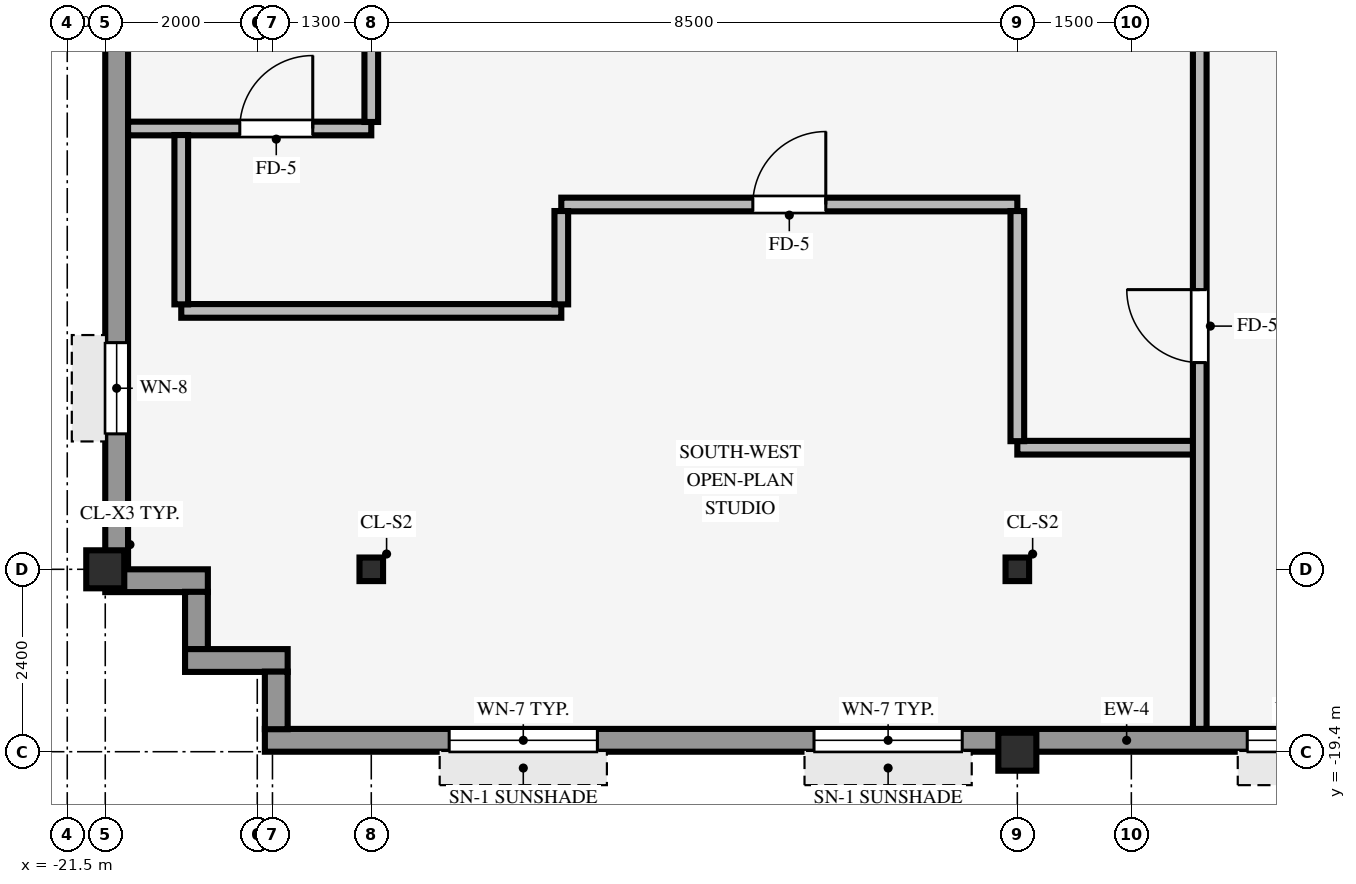
"""IFC4 building model, lengths in metres.
Left out: names, types, materials, properties, quantities, classifications, styles, units other than length and angle.
Written with IfcOpenShell. Run it as: python <this file> out.ifc"""

import sys

from ifc_helpers import new_model, si_unit, direction, frame, frame_2d, origin, origin_2d, place, context, subcontext, project, spatial, rectangle, hollow_rectangle, i_section, extrude, source, transform, mapped, element, fill, save


model = new_model("IFC4")
c1 = context("Model", 3, precision=1e-05, world=origin(), true_north=direction((0.0, 1.0)))
c2 = subcontext(c1, "Body", "Model", "MODEL_VIEW")
j1 = project(units=[si_unit("LENGTHUNIT", "METRE"), si_unit("PLANEANGLEUNIT", "RADIAN")], contexts=[c1])
p1 = place(None, origin())
s1 = spatial("IfcSite", under=j1, at=p1, CompositionType="ELEMENT")
p2 = place(p1, origin())
s2 = spatial("IfcBuilding", under=s1, at=p2, CompositionType="ELEMENT")
p3 = place(p2, frame((0.0, 0.0, 265.25)))
s3 = spatial("IfcBuildingStorey", under=s2, at=p3, CompositionType="ELEMENT", Elevation=265.25)
for number, where, z_axis, x_axis in (
    (1, (-21.0, -17.0, 0.0), (0.0, 0.0, 1.0), (1.0, 0.0, 0.0)),
    (2, (-9.0, -19.4, 0.0), (0.0, 0.0, 1.0), (1.0, 0.0, 0.0)),
):
    element("IfcColumn", number, at=place(p3, frame(where, z_axis=z_axis, x_axis=x_axis)), inside=s3, PredefinedType="COLUMN", context=c2, shape_type="SweptSolid", body=[
        extrude(hollow_rectangle(XDim=0.5, YDim=0.5, WallThickness=0.032, InnerFilletRadius=0.032, OuterFilletRadius=0.064, at=origin_2d()), origin(), (0.0, 0.0, 1.0), 3.37),
    ])
for number, where, z_axis, x_axis in (
    (3, (-17.5, -17.0, 0.0), (0.0, 0.0, 1.0), (1.0, 0.0, 0.0)),
    (4, (-9.0, -17.0, 0.0), (0.0, 0.0, 1.0), (1.0, 0.0, 0.0)),
):
    element("IfcColumn", number, at=place(p3, frame(where, z_axis=z_axis, x_axis=x_axis)), inside=s3, PredefinedType="COLUMN", context=c2, shape_type="SweptSolid", body=[
        extrude(i_section(OverallWidth=0.31, OverallDepth=0.31, WebThickness=0.015, FlangeThickness=0.015, FilletRadius=0.015, at=origin_2d()), origin(), (0.0, 0.0, 1.0), 3.37),
    ])
p4 = place(p3, frame((-18.9, -19.25, 0.0), z_axis=(0.0, 0.0, 1.0), x_axis=(1.0, 0.0, 0.0)))
e5 = element("IfcWall", 5, at=p4, inside=s3, PredefinedType="STANDARD", context=c2, shape_type="SweptSolid", body=[
    extrude(rectangle(XDim=35.6, YDim=0.3, at=frame_2d((17.8, 0.0))), origin(), (0.0, 0.0, 1.0), 2.705),
])
p5 = place(p4, frame((24.15, 0.0, 0.0), z_axis=(0.0, 0.0, 1.0), x_axis=(-1.0, 0.0, 0.0)))
e6 = element("IfcOpeningElement", 6, at=p5, cuts=e5, PredefinedType="OPENING", context=c2, shape_type="SweptSolid", body=[
    extrude(rectangle(XDim=1.05, YDim=2.1, at=frame_2d((0.525, 1.05))), frame((0.0, 0.16, 0.0), z_axis=(0.0, -1.0, 0.0), x_axis=(1.0, 0.0, 0.0)), (0.0, 0.0, 1.0), 0.32),
])
p6 = place(p4, frame((2.425, 0.0, 0.8)))
e7 = element("IfcOpeningElement", 7, at=p6, cuts=e5, PredefinedType="OPENING", context=c2, shape_type="SweptSolid", body=[
    extrude(rectangle(XDim=1.95, YDim=1.48, at=frame_2d((0.975, 0.74))), frame((0.0, 0.16, 0.0), z_axis=(0.0, -1.0, 0.0), x_axis=(1.0, 0.0, 0.0)), (0.0, 0.0, 1.0), 0.32),
])
p7 = place(p4, frame((7.225, 0.0, 0.8)))
e8 = element("IfcOpeningElement", 8, at=p7, cuts=e5, PredefinedType="OPENING", context=c2, shape_type="SweptSolid", body=[
    extrude(rectangle(XDim=1.95, YDim=1.48, at=frame_2d((0.975, 0.74))), frame((0.0, 0.16, 0.0), z_axis=(0.0, -1.0, 0.0), x_axis=(1.0, 0.0, 0.0)), (0.0, 0.0, 1.0), 0.32),
])
p8 = place(p4, frame((12.925, 0.0, 0.8)))
e9 = element("IfcOpeningElement", 9, at=p8, cuts=e5, PredefinedType="OPENING", context=c2, shape_type="SweptSolid", body=[
    extrude(rectangle(XDim=1.95, YDim=1.48, at=frame_2d((0.975, 0.74))), frame((0.0, 0.16, 0.0), z_axis=(0.0, -1.0, 0.0), x_axis=(1.0, 0.0, 0.0)), (0.0, 0.0, 1.0), 0.32),
])
p9 = place(p4, frame((15.475, 0.0, 0.8)))
e10 = element("IfcOpeningElement", 10, at=p9, cuts=e5, PredefinedType="OPENING", context=c2, shape_type="SweptSolid", body=[
    extrude(rectangle(XDim=1.95, YDim=1.48, at=frame_2d((0.975, 0.74))), frame((0.0, 0.16, 0.0), z_axis=(0.0, -1.0, 0.0), x_axis=(1.0, 0.0, 0.0)), (0.0, 0.0, 1.0), 0.32),
])
p10 = place(p4, frame((20.725, 0.0, 0.8)))
e11 = element("IfcOpeningElement", 11, at=p10, cuts=e5, PredefinedType="OPENING", context=c2, shape_type="SweptSolid", body=[
    extrude(rectangle(XDim=1.95, YDim=1.48, at=frame_2d((0.975, 0.74))), frame((0.0, 0.16, 0.0), z_axis=(0.0, -1.0, 0.0), x_axis=(1.0, 0.0, 0.0)), (0.0, 0.0, 1.0), 0.32),
])
p11 = place(p4, frame((31.225, 0.0, 0.8)))
e12 = element("IfcOpeningElement", 12, at=p11, cuts=e5, PredefinedType="OPENING", context=c2, shape_type="SweptSolid", body=[
    extrude(rectangle(XDim=1.95, YDim=1.48, at=frame_2d((0.975, 0.74))), frame((0.0, 0.16, 0.0), z_axis=(0.0, -1.0, 0.0), x_axis=(1.0, 0.0, 0.0)), (0.0, 0.0, 1.0), 0.32),
])
p12 = place(p3, frame((-20.85, -17.004, 0.0), z_axis=(0.0, 0.0, 1.0), x_axis=(0.0, 1.0, 0.0)))
e13 = element("IfcWall", 13, at=p12, inside=s3, PredefinedType="STANDARD", context=c2, shape_type="SweptSolid", body=[
    extrude(rectangle(XDim=34.008, YDim=0.3, at=frame_2d((17.004, 0.0))), origin(), (0.0, 0.0, 1.0), 2.705),
])
p13 = place(p12, frame((1.786, 0.0, 0.8)))
e14 = element("IfcOpeningElement", 14, at=p13, cuts=e13, PredefinedType="OPENING", context=c2, shape_type="SweptSolid", body=[
    extrude(rectangle(XDim=1.2, YDim=1.48, at=frame_2d((0.6, 0.74))), frame((0.0, 0.16, 0.0), z_axis=(0.0, -1.0, 0.0), x_axis=(1.0, 0.0, 0.0)), (0.0, 0.0, 1.0), 0.32),
])
p14 = place(p12, frame((8.159, 0.0, 0.8)))
e15 = element("IfcOpeningElement", 15, at=p14, cuts=e13, PredefinedType="OPENING", context=c2, shape_type="SweptSolid", body=[
    extrude(rectangle(XDim=1.2, YDim=1.48, at=frame_2d((0.6, 0.74))), frame((0.0, 0.16, 0.0), z_axis=(0.0, -1.0, 0.0), x_axis=(1.0, 0.0, 0.0)), (0.0, 0.0, 1.0), 0.32),
])
p15 = place(p12, frame((11.831, 0.0, 0.8)))
e16 = element("IfcOpeningElement", 16, at=p15, cuts=e13, PredefinedType="OPENING", context=c2, shape_type="SweptSolid", body=[
    extrude(rectangle(XDim=1.2, YDim=1.48, at=frame_2d((0.6, 0.74))), frame((0.0, 0.16, 0.0), z_axis=(0.0, -1.0, 0.0), x_axis=(1.0, 0.0, 0.0)), (0.0, 0.0, 1.0), 0.32),
])
p16 = place(p12, frame((17.754, 0.0, 0.8)))
e17 = element("IfcOpeningElement", 17, at=p16, cuts=e13, PredefinedType="OPENING", context=c2, shape_type="SweptSolid", body=[
    extrude(rectangle(XDim=1.2, YDim=1.48, at=frame_2d((0.6, 0.74))), frame((0.0, 0.16, 0.0), z_axis=(0.0, -1.0, 0.0), x_axis=(1.0, 0.0, 0.0)), (0.0, 0.0, 1.0), 0.32),
])
p17 = place(p12, frame((20.977, 0.0, 0.8)))
e18 = element("IfcOpeningElement", 18, at=p17, cuts=e13, PredefinedType="OPENING", context=c2, shape_type="SweptSolid", body=[
    extrude(rectangle(XDim=1.2, YDim=1.48, at=frame_2d((0.6, 0.74))), frame((0.0, 0.16, 0.0), z_axis=(0.0, -1.0, 0.0), x_axis=(1.0, 0.0, 0.0)), (0.0, 0.0, 1.0), 0.32),
])
p18 = place(p12, frame((24.649, 0.0, 0.8)))
e19 = element("IfcOpeningElement", 19, at=p18, cuts=e13, PredefinedType="OPENING", context=c2, shape_type="SweptSolid", body=[
    extrude(rectangle(XDim=1.2, YDim=1.48, at=frame_2d((0.6, 0.74))), frame((0.0, 0.16, 0.0), z_axis=(0.0, -1.0, 0.0), x_axis=(1.0, 0.0, 0.0)), (0.0, 0.0, 1.0), 0.32),
])
p19 = place(p12, frame((31.022, 0.0, 0.8)))
e20 = element("IfcOpeningElement", 20, at=p19, cuts=e13, PredefinedType="OPENING", context=c2, shape_type="SweptSolid", body=[
    extrude(rectangle(XDim=1.2, YDim=1.48, at=frame_2d((0.6, 0.74))), frame((0.0, 0.16, 0.0), z_axis=(0.0, -1.0, 0.0), x_axis=(1.0, 0.0, 0.0)), (0.0, 0.0, 1.0), 0.32),
])
p20 = place(p3, frame((-21.0, -17.15, 0.0), z_axis=(0.0, 0.0, 1.0), x_axis=(1.0, 0.0, 0.0)))
e21 = element("IfcWall", 21, at=p20, inside=s3, PredefinedType="STANDARD", context=c2, shape_type="SweptSolid", body=[
    extrude(rectangle(XDim=1.35, YDim=0.3, at=frame_2d((0.675, 0.0))), origin(), (0.0, 0.0, 1.0), 2.892),
])
p21 = place(p3, frame((-19.8, -18.054, 0.0), z_axis=(0.0, 0.0, 1.0), x_axis=(0.0, 1.0, 0.0)))
e22 = element("IfcWall", 22, at=p21, inside=s3, PredefinedType="STANDARD", context=c2, shape_type="SweptSolid", body=[
    extrude(rectangle(XDim=0.758, YDim=0.3, at=frame_2d((0.379, 0.0))), origin(), (0.0, 0.0, 1.0), 2.892),
])
p22 = place(p3, frame((-19.95, -18.2, 0.0), z_axis=(0.0, 0.0, 1.0), x_axis=(1.0, 0.0, 0.0)))
e23 = element("IfcWall", 23, at=p22, inside=s3, PredefinedType="STANDARD", context=c2, shape_type="SweptSolid", body=[
    extrude(rectangle(XDim=1.35, YDim=0.3, at=frame_2d((0.675, 0.0))), origin(), (0.0, 0.0, 1.0), 2.892),
])
p23 = place(p3, frame((-18.75, -19.104, 0.0), z_axis=(0.0, 0.0, 1.0), x_axis=(0.0, 1.0, 0.0)))
e24 = element("IfcWall", 24, at=p23, inside=s3, PredefinedType="STANDARD", context=c2, shape_type="SweptSolid", body=[
    extrude(rectangle(XDim=0.758, YDim=0.3, at=frame_2d((0.379, 0.0))), origin(), (0.0, 0.0, 1.0), 2.892),
])
p24 = place(p3, frame((-9.0, -15.4, 0.0), z_axis=(0.0, 0.0, 1.0), x_axis=(1.0, 0.0, 0.0)))
e25 = element("IfcWall", 25, at=p24, inside=s3, PredefinedType="PARTITIONING", context=c2, shape_type="SweptSolid", body=[
    extrude(rectangle(XDim=2.324, YDim=0.18, at=frame_2d((1.162, 0.0))), origin(), (0.0, 0.0, 1.0), 3.36),
])
p25 = place(p3, frame((-20.0, -13.6, 0.0), z_axis=(0.0, 0.0, 1.0), x_axis=(1.0, 0.0, 0.0)))
e26 = element("IfcWall", 26, at=p25, inside=s3, PredefinedType="PARTITIONING", context=c2, shape_type="SweptSolid", body=[
    extrude(rectangle(XDim=5.0, YDim=0.18, at=frame_2d((2.5, 0.0))), origin(), (0.0, 0.0, 1.0), 3.038),
])
p26 = place(p3, frame((-15.0, -12.2, 0.0), z_axis=(0.0, 0.0, 1.0), x_axis=(1.0, 0.0, 0.0)))
e27 = element("IfcWall", 27, at=p26, inside=s3, PredefinedType="PARTITIONING", context=c2, shape_type="SweptSolid", body=[
    extrude(rectangle(XDim=6.0, YDim=0.18, at=frame_2d((3.0, 0.0))), origin(), (0.0, 0.0, 1.0), 3.36),
])
p27 = place(p26, frame((2.52, 0.0, 0.0)))
e28 = element("IfcOpeningElement", 28, at=p27, cuts=e27, PredefinedType="OPENING", context=c2, shape_type="SweptSolid", body=[
    extrude(rectangle(XDim=0.96, YDim=2.1, at=frame_2d((0.48, 1.05))), frame((0.0, 0.1, 0.0), z_axis=(0.0, -1.0, 0.0), x_axis=(1.0, 0.0, 0.0)), (0.0, 0.0, 1.0), 0.2),
])
p28 = place(p3, frame((-20.7, -11.2, 0.0), z_axis=(0.0, 0.0, 1.0), x_axis=(1.0, 0.0, 0.0)))
e29 = element("IfcWall", 29, at=p28, inside=s3, PredefinedType="PARTITIONING", context=c2, shape_type="SweptSolid", body=[
    extrude(rectangle(XDim=3.2, YDim=0.18, at=frame_2d((1.6, 0.0))), origin(), (0.0, 0.0, 1.0), 3.36),
])
p29 = place(p28, frame((1.47, 0.0, 0.0)))
e30 = element("IfcOpeningElement", 30, at=p29, cuts=e29, PredefinedType="OPENING", context=c2, shape_type="SweptSolid", body=[
    extrude(rectangle(XDim=0.96, YDim=2.1, at=frame_2d((0.48, 1.05))), frame((0.0, 0.1, 0.0), z_axis=(0.0, -1.0, 0.0), x_axis=(1.0, 0.0, 0.0)), (0.0, 0.0, 1.0), 0.2),
])
p30 = place(p3, frame((-20.0, -13.514, 0.0), z_axis=(0.0, 0.0, 1.0), x_axis=(0.0, 1.0, 0.0)))
e31 = element("IfcWall", 31, at=p30, inside=s3, PredefinedType="PARTITIONING", context=c2, shape_type="SweptSolid", body=[
    extrude(rectangle(XDim=2.228, YDim=0.18, at=frame_2d((1.114, 0.0))), origin(), (0.0, 0.0, 1.0), 3.36),
])
p31 = place(p3, frame((-17.5, -11.114, 0.0), z_axis=(0.0, 0.0, 1.0), x_axis=(0.0, 1.0, 0.0)))
e32 = element("IfcWall", 32, at=p31, inside=s3, PredefinedType="PARTITIONING", context=c2, shape_type="SweptSolid", body=[
    extrude(rectangle(XDim=1.118, YDim=0.18, at=frame_2d((0.559, 0.0))), origin(), (0.0, 0.0, 1.0), 2.892),
])
p32 = place(p3, frame((-15.0, -13.514, 0.0), z_axis=(0.0, 0.0, 1.0), x_axis=(0.0, 1.0, 0.0)))
e33 = element("IfcWall", 33, at=p32, inside=s3, PredefinedType="PARTITIONING", context=c2, shape_type="SweptSolid", body=[
    extrude(rectangle(XDim=1.228, YDim=0.18, at=frame_2d((0.614, 0.0))), origin(), (0.0, 0.0, 1.0), 3.36),
])
p33 = place(p3, frame((-9.0, -15.314, 0.0), z_axis=(0.0, 0.0, 1.0), x_axis=(0.0, 1.0, 0.0)))
e34 = element("IfcWall", 34, at=p33, inside=s3, PredefinedType="PARTITIONING", context=c2, shape_type="SweptSolid", body=[
    extrude(rectangle(XDim=3.028, YDim=0.18, at=frame_2d((1.514, 0.0))), origin(), (0.0, 0.0, 1.0), 2.892),
])
p34 = place(p3, frame((-6.6, -19.1, 0.0), z_axis=(0.0, 0.0, 1.0), x_axis=(0.0, 1.0, 0.0)))
e35 = element("IfcWall", 35, at=p34, inside=s3, PredefinedType="PARTITIONING", context=c2, shape_type="SweptSolid", body=[
    extrude(rectangle(XDim=17.764, YDim=0.18, at=frame_2d((8.882, 0.0))), origin(), (0.0, 0.0, 1.0), 3.36),
])
p35 = place(p34, frame((13.152, 0.0, 0.0)))
e36 = element("IfcOpeningElement", 36, at=p35, cuts=e35, PredefinedType="OPENING", context=c2, shape_type="SweptSolid", body=[
    extrude(rectangle(XDim=0.96, YDim=2.1, at=frame_2d((0.48, 1.05))), frame((0.0, 0.1, 0.0), z_axis=(0.0, -1.0, 0.0), x_axis=(1.0, 0.0, 0.0)), (0.0, 0.0, 1.0), 0.2),
])
p36 = place(p34, frame((4.82, 0.0, 0.0)))
e37 = element("IfcOpeningElement", 37, at=p36, cuts=e35, PredefinedType="OPENING", context=c2, shape_type="SweptSolid", body=[
    extrude(rectangle(XDim=0.96, YDim=2.1, at=frame_2d((0.48, 1.05))), frame((0.0, 0.1, 0.0), z_axis=(0.0, -1.0, 0.0), x_axis=(1.0, 0.0, 0.0)), (0.0, 0.0, 1.0), 0.2),
])
m1 = source(origin(), c2, "Body", "SweptSolid", [
    extrude(rectangle(XDim=1.95, YDim=1.48, at=frame_2d((0.975, 0.74))), frame((0.0, 0.03, 0.0), z_axis=(0.0, -1.0, 0.0), x_axis=(1.0, 0.0, 0.0)), (0.0, 0.0, 1.0), 0.06),
])
p37 = place(p6, origin())
e38 = element("IfcWindow", 38, at=p37, inside=s3, PartitioningType="SINGLE_PANEL", PredefinedType="WINDOW", context=c2, shape_type="MappedRepresentation", body=[
    mapped(m1, transform((0.0, 0.0, 0.0), scale=1.0)),
])
fill(e7, e38)
p38 = place(p7, origin())
e39 = element("IfcWindow", 39, at=p38, inside=s3, PartitioningType="SINGLE_PANEL", PredefinedType="WINDOW", context=c2, shape_type="MappedRepresentation", body=[
    mapped(m1, transform((0.0, 0.0, 0.0), scale=1.0)),
])
fill(e8, e39)
p39 = place(p8, origin())
e40 = element("IfcWindow", 40, at=p39, inside=s3, PartitioningType="SINGLE_PANEL", PredefinedType="WINDOW", context=c2, shape_type="MappedRepresentation", body=[
    mapped(m1, transform((0.0, 0.0, 0.0), scale=1.0)),
])
fill(e9, e40)
m2 = source(origin(), c2, "Body", "SweptSolid", [
    extrude(rectangle(XDim=1.2, YDim=1.48, at=frame_2d((0.6, 0.74))), frame((0.0, 0.03, 0.0), z_axis=(0.0, -1.0, 0.0), x_axis=(1.0, 0.0, 0.0)), (0.0, 0.0, 1.0), 0.06),
])
p40 = place(p13, origin())
e41 = element("IfcWindow", 41, at=p40, inside=s3, PartitioningType="SINGLE_PANEL", PredefinedType="WINDOW", context=c2, shape_type="MappedRepresentation", body=[
    mapped(m2, transform((0.0, 0.0, 0.0), scale=1.0)),
])
fill(e14, e41)
m3 = source(origin(), c2, "Body", "SweptSolid", [
    extrude(rectangle(XDim=0.96, YDim=2.1, at=frame_2d((0.48, 1.05))), frame((0.0, 0.025, 0.0), z_axis=(0.0, -1.0, 0.0), x_axis=(1.0, 0.0, 0.0)), (0.0, 0.0, 1.0), 0.05),
])
p41 = place(p27, origin())
e42 = element("IfcDoor", 42, at=p41, inside=s3, OperationType="SINGLE_SWING_RIGHT", PredefinedType="DOOR", context=c2, shape_type="MappedRepresentation", body=[
    mapped(m3, transform((0.0, 0.0, 0.0), scale=1.0)),
])
fill(e28, e42)
p42 = place(p36, origin())
e43 = element("IfcDoor", 43, at=p42, inside=s3, OperationType="SINGLE_SWING_RIGHT", PredefinedType="DOOR", context=c2, shape_type="MappedRepresentation", body=[
    mapped(m3, transform((0.0, 0.0, 0.0), scale=1.0)),
])
fill(e37, e43)
p43 = place(p29, origin())
e44 = element("IfcDoor", 44, at=p43, inside=s3, OperationType="SINGLE_SWING_RIGHT", PredefinedType="DOOR", context=c2, shape_type="MappedRepresentation", body=[
    mapped(m3, transform((0.0, 0.0, 0.0), scale=1.0)),
])
fill(e30, e44)
save(model, sys.argv[1])
